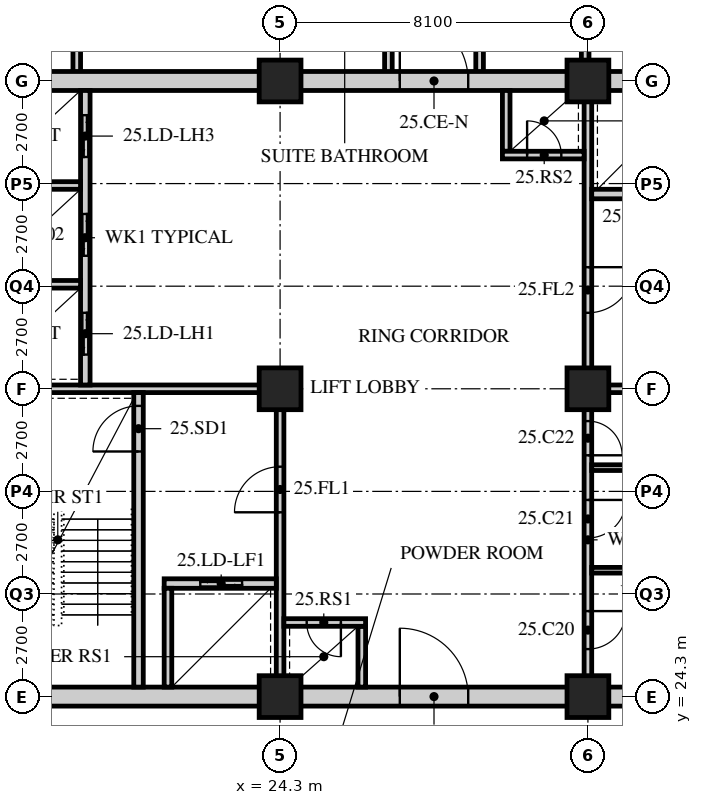
"""IFC4 building model, lengths in metres.
Left out: names, types, materials, properties, quantities, classifications, styles, units other than length and angle.
Written with IfcOpenShell. Run it as: python <this file> out.ifc"""

import sys

from ifc_helpers import new_model, si_unit, direction, frame, frame_2d, origin, origin_2d, place, context, subcontext, project, spatial, rectangle, hollow_rectangle, extrude, element, fill, save


model = new_model("IFC4")
c1 = context("Model", 3, precision=1e-05, world=origin(), true_north=direction((0.0, 1.0)))
c2 = subcontext(c1, "Body", "Model", "MODEL_VIEW")
j1 = project(units=[si_unit("LENGTHUNIT", "METRE"), si_unit("PLANEANGLEUNIT", "RADIAN")], contexts=[c1])
p1 = place(None, origin())
s1 = spatial("IfcSite", under=j1, at=p1, CompositionType="ELEMENT")
p2 = place(p1, origin())
s2 = spatial("IfcBuilding", under=s1, at=p2, CompositionType="ELEMENT")
p3 = place(p2, frame((0.0, 0.0, 103.4)))
s3 = spatial("IfcBuildingStorey", under=s2, at=p3, CompositionType="ELEMENT", Elevation=103.4)
for number, where, z_axis, x_axis in (
    (1, (24.3, 24.3, 0.0), (0.0, 0.0, 1.0), (1.0, 0.0, 0.0)),
    (2, (24.3, 32.4, 0.0), (0.0, 0.0, 1.0), (1.0, 0.0, 0.0)),
    (3, (24.3, 40.5, 0.0), (0.0, 0.0, 1.0), (1.0, 0.0, 0.0)),
    (4, (32.4, 24.3, 0.0), (0.0, 0.0, 1.0), (1.0, 0.0, 0.0)),
    (5, (32.4, 32.4, 0.0), (0.0, 0.0, 1.0), (1.0, 0.0, 0.0)),
    (6, (32.4, 40.5, 0.0), (0.0, 0.0, 1.0), (1.0, 0.0, 0.0)),
):
    element("IfcColumn", number, at=place(p3, frame(where, z_axis=z_axis, x_axis=x_axis)), inside=s3, PredefinedType="COLUMN", context=c2, shape_type="SweptSolid", body=[
        extrude(hollow_rectangle(XDim=1.1, YDim=1.1, WallThickness=0.1, at=origin_2d()), origin(), (0.0, 0.0, 1.0), 3.4),
    ])
p4 = place(p3, frame((18.95, 44.1, 0.0), z_axis=(0.0, 0.0, 1.0), x_axis=(0.0, -1.0, 0.0)))
e7 = element("IfcWall", 7, at=p4, inside=s3, PredefinedType="SOLIDWALL", context=c2, shape_type="SweptSolid", body=[
    extrude(rectangle(XDim=3.6, YDim=0.2, at=frame_2d((1.8, 0.0))), origin(), (0.0, 0.0, 1.0), 3.19),
])
p5 = place(p3, frame((32.328, 44.1, 0.0), z_axis=(0.0, 0.0, 1.0), x_axis=(0.0, -1.0, 0.0)))
e8 = element("IfcWall", 8, at=p5, inside=s3, PredefinedType="SOLIDWALL", context=c2, shape_type="SweptSolid", body=[
    extrude(rectangle(XDim=3.6, YDim=0.2, at=frame_2d((1.8, 0.0))), origin(), (0.0, 0.0, 1.0), 2.578),
])
for number, where, z_axis, x_axis in (
    (9, (27.15, 40.5, 0.0), (0.0, 0.0, 1.0), (0.0, 1.0, 0.0)),
    (10, (29.55, 40.5, 0.0), (0.0, 0.0, 1.0), (0.0, 1.0, 0.0)),
):
    element("IfcWall", number, at=place(p3, frame(where, z_axis=z_axis, x_axis=x_axis)), inside=s3, PredefinedType="SOLIDWALL", context=c2, shape_type="SweptSolid", body=[
        extrude(rectangle(XDim=3.6, YDim=0.2, at=frame_2d((1.8, 0.0))), origin(), (0.0, 0.0, 1.0), 3.19),
    ])
p6 = place(p3, frame((15.95, 24.3, 0.0), z_axis=(0.0, 0.0, 1.0), x_axis=(1.0, 0.0, 0.0)))
e11 = element("IfcWall", 11, at=p6, inside=s3, PredefinedType="SOLIDWALL", context=c2, shape_type="SweptSolid", body=[
    extrude(rectangle(XDim=24.8, YDim=0.5, at=frame_2d((12.4, 0.0))), origin(), (0.0, 0.0, 1.0), 2.54),
])
p7 = place(p6, frame((11.5, 0.0, 0.0)))
e12 = element("IfcOpeningElement", 12, at=p7, cuts=e11, PredefinedType="OPENING", context=c2, shape_type="SweptSolid", body=[
    extrude(rectangle(XDim=1.8, YDim=2.4, at=frame_2d((0.9, 1.2))), frame((0.0, 0.26, 0.0), z_axis=(0.0, -1.0, 0.0), x_axis=(1.0, 0.0, 0.0)), (0.0, 0.0, 1.0), 0.52),
])
p8 = place(p3, frame((15.95, 40.5, 0.0), z_axis=(0.0, 0.0, 1.0), x_axis=(1.0, 0.0, 0.0)))
e13 = element("IfcWall", 13, at=p8, inside=s3, PredefinedType="SOLIDWALL", context=c2, shape_type="SweptSolid", body=[
    extrude(rectangle(XDim=24.8, YDim=0.5, at=frame_2d((12.4, 0.0))), origin(), (0.0, 0.0, 1.0), 2.54),
])
p9 = place(p8, frame((11.5, 0.0, 0.0)))
e14 = element("IfcOpeningElement", 14, at=p9, cuts=e13, PredefinedType="OPENING", context=c2, shape_type="SweptSolid", body=[
    extrude(rectangle(XDim=1.8, YDim=2.4, at=frame_2d((0.9, 1.2))), frame((0.0, 0.26, 0.0), z_axis=(0.0, -1.0, 0.0), x_axis=(1.0, 0.0, 0.0)), (0.0, 0.0, 1.0), 0.52),
])
p10 = place(p3, frame((16.45, 32.4, 0.0), z_axis=(0.0, 0.0, 1.0), x_axis=(1.0, 0.0, 0.0)))
e15 = element("IfcWall", 15, at=p10, inside=s3, PredefinedType="SOLIDWALL", context=c2, shape_type="SweptSolid", body=[
    extrude(rectangle(XDim=7.95, YDim=0.2, at=frame_2d((3.975, 0.0))), origin(), (0.0, 0.0, 1.0), 2.578),
])
p11 = place(p3, frame((24.3, 24.55, 0.0), z_axis=(0.0, 0.0, 1.0), x_axis=(0.0, 1.0, 0.0)))
e16 = element("IfcWall", 16, at=p11, inside=s3, PredefinedType="SOLIDWALL", context=c2, shape_type="SweptSolid", body=[
    extrude(rectangle(XDim=7.75, YDim=0.2, at=frame_2d((3.875, 0.0))), origin(), (0.0, 0.0, 1.0), 2.578),
])
p12 = place(p11, frame((4.6, 0.0, 0.0)))
e17 = element("IfcOpeningElement", 17, at=p12, cuts=e16, PredefinedType="OPENING", context=c2, shape_type="SweptSolid", body=[
    extrude(rectangle(XDim=1.2, YDim=2.1, at=frame_2d((0.6, 1.05))), frame((0.0, 0.11, 0.0), z_axis=(0.0, -1.0, 0.0), x_axis=(1.0, 0.0, 0.0)), (0.0, 0.0, 1.0), 0.22),
])
p13 = place(p3, frame((20.575, 24.55, 0.0), z_axis=(0.0, 0.0, 1.0), x_axis=(0.0, 1.0, 0.0)))
e18 = element("IfcWall", 18, at=p13, inside=s3, PredefinedType="SOLIDWALL", context=c2, shape_type="SweptSolid", body=[
    extrude(rectangle(XDim=7.75, YDim=0.25, at=frame_2d((3.875, 0.0))), origin(), (0.0, 0.0, 1.0), 3.19),
])
p14 = place(p13, frame((6.2, 0.0, 0.0)))
e19 = element("IfcOpeningElement", 19, at=p14, cuts=e18, PredefinedType="OPENING", context=c2, shape_type="SweptSolid", body=[
    extrude(rectangle(XDim=1.2, YDim=2.1, at=frame_2d((0.6, 1.05))), frame((0.0, 0.135, 0.0), z_axis=(0.0, -1.0, 0.0), x_axis=(1.0, 0.0, 0.0)), (0.0, 0.0, 1.0), 0.27),
])
p15 = place(p3, frame((21.25, 27.275, 0.0), z_axis=(0.0, 0.0, 1.0), x_axis=(1.0, 0.0, 0.0)))
e20 = element("IfcWall", 20, at=p15, inside=s3, PredefinedType="SOLIDWALL", context=c2, shape_type="SweptSolid", body=[
    extrude(rectangle(XDim=2.95, YDim=0.25, at=frame_2d((1.475, 0.0))), origin(), (0.0, 0.0, 1.0), 3.19),
])
p16 = place(p15, frame((0.95, 0.0, 0.0)))
e21 = element("IfcOpeningElement", 21, at=p16, cuts=e20, PredefinedType="OPENING", context=c2, shape_type="SweptSolid", body=[
    extrude(rectangle(XDim=1.1, YDim=2.4, at=frame_2d((0.55, 1.2))), frame((0.0, 0.135, 0.0), z_axis=(0.0, -1.0, 0.0), x_axis=(1.0, 0.0, 0.0)), (0.0, 0.0, 1.0), 0.27),
])
p17 = place(p3, frame((21.35, 24.55, 0.0), z_axis=(0.0, 0.0, 1.0), x_axis=(0.0, 1.0, 0.0)))
e22 = element("IfcWall", 22, at=p17, inside=s3, PredefinedType="SOLIDWALL", context=c2, shape_type="SweptSolid", body=[
    extrude(rectangle(XDim=2.6, YDim=0.2, at=frame_2d((1.3, 0.0))), origin(), (0.0, 0.0, 1.0), 3.19),
])
p18 = place(p3, frame((19.175, 32.5, 0.0), z_axis=(0.0, 0.0, 1.0), x_axis=(0.0, 1.0, 0.0)))
e23 = element("IfcWall", 23, at=p18, inside=s3, PredefinedType="SOLIDWALL", context=c2, shape_type="SweptSolid", body=[
    extrude(rectangle(XDim=7.75, YDim=0.25, at=frame_2d((3.875, 0.0))), origin(), (0.0, 0.0, 1.0), 3.19),
])
p19 = place(p18, frame((0.8, 0.0, 0.0)))
e24 = element("IfcOpeningElement", 24, at=p19, cuts=e23, PredefinedType="OPENING", context=c2, shape_type="SweptSolid", body=[
    extrude(rectangle(XDim=1.1, YDim=2.4, at=frame_2d((0.55, 1.2))), frame((0.0, 0.135, 0.0), z_axis=(0.0, -1.0, 0.0), x_axis=(1.0, 0.0, 0.0)), (0.0, 0.0, 1.0), 0.27),
])
p20 = place(p18, frame((3.4, 0.0, 0.0)))
e25 = element("IfcOpeningElement", 25, at=p20, cuts=e23, PredefinedType="OPENING", context=c2, shape_type="SweptSolid", body=[
    extrude(rectangle(XDim=1.1, YDim=2.4, at=frame_2d((0.55, 1.2))), frame((0.0, 0.135, 0.0), z_axis=(0.0, -1.0, 0.0), x_axis=(1.0, 0.0, 0.0)), (0.0, 0.0, 1.0), 0.27),
])
p21 = place(p18, frame((6.0, 0.0, 0.0)))
e26 = element("IfcOpeningElement", 26, at=p21, cuts=e23, PredefinedType="OPENING", context=c2, shape_type="SweptSolid", body=[
    extrude(rectangle(XDim=1.1, YDim=2.4, at=frame_2d((0.55, 1.2))), frame((0.0, 0.135, 0.0), z_axis=(0.0, -1.0, 0.0), x_axis=(1.0, 0.0, 0.0)), (0.0, 0.0, 1.0), 0.27),
])
for number, where, z_axis, x_axis in (
    (27, (16.45, 35.15, 0.0), (0.0, 0.0, 1.0), (1.0, 0.0, 0.0)),
    (28, (16.45, 37.75, 0.0), (0.0, 0.0, 1.0), (1.0, 0.0, 0.0)),
):
    element("IfcWall", number, at=place(p3, frame(where, z_axis=z_axis, x_axis=x_axis)), inside=s3, PredefinedType="SOLIDWALL", context=c2, shape_type="SweptSolid", body=[
        extrude(rectangle(XDim=2.6, YDim=0.2, at=frame_2d((1.3, 0.0))), origin(), (0.0, 0.0, 1.0), 3.19),
    ])
p22 = place(p3, frame((26.45, 24.55, 0.0), z_axis=(0.0, 0.0, 1.0), x_axis=(0.0, 1.0, 0.0)))
e29 = element("IfcWall", 29, at=p22, inside=s3, PredefinedType="SOLIDWALL", context=c2, shape_type="SweptSolid", body=[
    extrude(rectangle(XDim=1.6, YDim=0.2, at=frame_2d((0.8, 0.0))), origin(), (0.0, 0.0, 1.0), 3.19),
])
p23 = place(p3, frame((24.4, 26.25, 0.0), z_axis=(0.0, 0.0, 1.0), x_axis=(1.0, 0.0, 0.0)))
e30 = element("IfcWall", 30, at=p23, inside=s3, PredefinedType="SOLIDWALL", context=c2, shape_type="SweptSolid", body=[
    extrude(rectangle(XDim=2.15, YDim=0.2, at=frame_2d((1.075, 0.0))), origin(), (0.0, 0.0, 1.0), 3.19),
])
p24 = place(p23, frame((0.6, 0.0, 0.0)))
e31 = element("IfcOpeningElement", 31, at=p24, cuts=e30, PredefinedType="OPENING", context=c2, shape_type="SweptSolid", body=[
    extrude(rectangle(XDim=0.9, YDim=2.1, at=frame_2d((0.45, 1.05))), frame((0.0, 0.11, 0.0), z_axis=(0.0, -1.0, 0.0), x_axis=(1.0, 0.0, 0.0)), (0.0, 0.0, 1.0), 0.22),
])
p25 = place(p3, frame((32.3, 32.4, 0.0), z_axis=(0.0, 0.0, 1.0), x_axis=(1.0, 0.0, 0.0)))
e32 = element("IfcWall", 32, at=p25, inside=s3, PredefinedType="SOLIDWALL", context=c2, shape_type="SweptSolid", body=[
    extrude(rectangle(XDim=7.95, YDim=0.2, at=frame_2d((3.975, 0.0))), origin(), (0.0, 0.0, 1.0), 2.578),
])
p26 = place(p3, frame((32.4, 32.5, 0.0), z_axis=(0.0, 0.0, 1.0), x_axis=(0.0, 1.0, 0.0)))
e33 = element("IfcWall", 33, at=p26, inside=s3, PredefinedType="SOLIDWALL", context=c2, shape_type="SweptSolid", body=[
    extrude(rectangle(XDim=7.75, YDim=0.2, at=frame_2d((3.875, 0.0))), origin(), (0.0, 0.0, 1.0), 2.578),
])
p27 = place(p26, frame((1.9, 0.0, 0.0)))
e34 = element("IfcOpeningElement", 34, at=p27, cuts=e33, PredefinedType="OPENING", context=c2, shape_type="SweptSolid", body=[
    extrude(rectangle(XDim=1.2, YDim=2.1, at=frame_2d((0.6, 1.05))), frame((0.0, 0.11, 0.0), z_axis=(0.0, -1.0, 0.0), x_axis=(1.0, 0.0, 0.0)), (0.0, 0.0, 1.0), 0.22),
])
p28 = place(p3, frame((32.5, 37.525, 0.0), z_axis=(0.0, 0.0, 1.0), x_axis=(1.0, 0.0, 0.0)))
e35 = element("IfcWall", 35, at=p28, inside=s3, PredefinedType="SOLIDWALL", context=c2, shape_type="SweptSolid", body=[
    extrude(rectangle(XDim=2.95, YDim=0.25, at=frame_2d((1.475, 0.0))), origin(), (0.0, 0.0, 1.0), 3.19),
])
p29 = place(p28, frame((0.9, 0.0, 0.0)))
e36 = element("IfcOpeningElement", 36, at=p29, cuts=e35, PredefinedType="OPENING", context=c2, shape_type="SweptSolid", body=[
    extrude(rectangle(XDim=1.1, YDim=2.4, at=frame_2d((0.55, 1.2))), frame((0.0, 0.135, 0.0), z_axis=(0.0, -1.0, 0.0), x_axis=(1.0, 0.0, 0.0)), (0.0, 0.0, 1.0), 0.27),
])
p30 = place(p3, frame((30.25, 38.65, 0.0), z_axis=(0.0, 0.0, 1.0), x_axis=(0.0, 1.0, 0.0)))
e37 = element("IfcWall", 37, at=p30, inside=s3, PredefinedType="SOLIDWALL", context=c2, shape_type="SweptSolid", body=[
    extrude(rectangle(XDim=1.6, YDim=0.2, at=frame_2d((0.8, 0.0))), origin(), (0.0, 0.0, 1.0), 3.19),
])
p31 = place(p3, frame((30.15, 38.55, 0.0), z_axis=(0.0, 0.0, 1.0), x_axis=(1.0, 0.0, 0.0)))
e38 = element("IfcWall", 38, at=p31, inside=s3, PredefinedType="SOLIDWALL", context=c2, shape_type="SweptSolid", body=[
    extrude(rectangle(XDim=2.15, YDim=0.2, at=frame_2d((1.075, 0.0))), origin(), (0.0, 0.0, 1.0), 3.19),
])
p32 = place(p31, frame((0.65, 0.0, 0.0)))
e39 = element("IfcOpeningElement", 39, at=p32, cuts=e38, PredefinedType="OPENING", context=c2, shape_type="SweptSolid", body=[
    extrude(rectangle(XDim=0.9, YDim=2.1, at=frame_2d((0.45, 1.05))), frame((0.0, 0.11, 0.0), z_axis=(0.0, -1.0, 0.0), x_axis=(1.0, 0.0, 0.0)), (0.0, 0.0, 1.0), 0.22),
])
p33 = place(p3, frame((32.4, 24.55, 0.0), z_axis=(0.0, 0.0, 1.0), x_axis=(0.0, 1.0, 0.0)))
e40 = element("IfcWall", 40, at=p33, inside=s3, PredefinedType="PARTITIONING", context=c2, shape_type="SweptSolid", body=[
    extrude(rectangle(XDim=7.75, YDim=0.2, at=frame_2d((3.875, 0.0))), origin(), (0.0, 0.0, 1.0), 2.578),
])
p34 = place(p33, frame((1.0, 0.0, 0.0)))
e41 = element("IfcOpeningElement", 41, at=p34, cuts=e40, PredefinedType="OPENING", context=c2, shape_type="SweptSolid", body=[
    extrude(rectangle(XDim=1.0, YDim=2.1, at=frame_2d((0.5, 1.05))), frame((0.0, 0.11, 0.0), z_axis=(0.0, -1.0, 0.0), x_axis=(1.0, 0.0, 0.0)), (0.0, 0.0, 1.0), 0.22),
])
p35 = place(p33, frame((3.925, 0.0, 0.0)))
e42 = element("IfcOpeningElement", 42, at=p35, cuts=e40, PredefinedType="OPENING", context=c2, shape_type="SweptSolid", body=[
    extrude(rectangle(XDim=1.0, YDim=2.1, at=frame_2d((0.5, 1.05))), frame((0.0, 0.11, 0.0), z_axis=(0.0, -1.0, 0.0), x_axis=(1.0, 0.0, 0.0)), (0.0, 0.0, 1.0), 0.22),
])
p36 = place(p33, frame((6.1, 0.0, 0.0)))
e43 = element("IfcOpeningElement", 43, at=p36, cuts=e40, PredefinedType="OPENING", context=c2, shape_type="SweptSolid", body=[
    extrude(rectangle(XDim=0.9, YDim=2.1, at=frame_2d((0.45, 1.05))), frame((0.0, 0.11, 0.0), z_axis=(0.0, -1.0, 0.0), x_axis=(1.0, 0.0, 0.0)), (0.0, 0.0, 1.0), 0.22),
])
for number, where, z_axis, x_axis in (
    (44, (32.5, 27.625, 0.0), (0.0, 0.0, 1.0), (1.0, 0.0, 0.0)),
    (45, (32.5, 30.325, 0.0), (0.0, 0.0, 1.0), (1.0, 0.0, 0.0)),
):
    element("IfcWall", number, at=place(p3, frame(where, z_axis=z_axis, x_axis=x_axis)), inside=s3, PredefinedType="PARTITIONING", context=c2, shape_type="SweptSolid", body=[
        extrude(rectangle(XDim=4.9, YDim=0.15, at=frame_2d((2.45, 0.0))), origin(), (0.0, 0.0, 1.0), 3.19),
    ])
p37 = place(p34, origin())
e46 = element("IfcDoor", 46, at=p37, inside=s3, OperationType="SINGLE_SWING_LEFT", PredefinedType="DOOR", context=c2, shape_type="SweptSolid", body=[
    extrude(rectangle(XDim=1.0, YDim=2.1, at=frame_2d((0.5, 1.05))), frame((0.0, 0.025, 0.0), z_axis=(0.0, -1.0, 0.0), x_axis=(1.0, 0.0, 0.0)), (0.0, 0.0, 1.0), 0.05),
])
fill(e41, e46)
p38 = place(p35, origin())
e47 = element("IfcDoor", 47, at=p38, inside=s3, OperationType="SINGLE_SWING_LEFT", PredefinedType="DOOR", context=c2, shape_type="SweptSolid", body=[
    extrude(rectangle(XDim=1.0, YDim=2.1, at=frame_2d((0.5, 1.05))), frame((0.0, 0.025, 0.0), z_axis=(0.0, -1.0, 0.0), x_axis=(1.0, 0.0, 0.0)), (0.0, 0.0, 1.0), 0.05),
])
fill(e42, e47)
p39 = place(p36, origin())
e48 = element("IfcDoor", 48, at=p39, inside=s3, OperationType="SINGLE_SWING_RIGHT", PredefinedType="DOOR", context=c2, shape_type="SweptSolid", body=[
    extrude(rectangle(XDim=0.9, YDim=2.1, at=frame_2d((0.45, 1.05))), frame((0.0, 0.025, 0.0), z_axis=(0.0, -1.0, 0.0), x_axis=(1.0, 0.0, 0.0)), (0.0, 0.0, 1.0), 0.05),
])
fill(e43, e48)
p40 = place(p14, origin())
e49 = element("IfcDoor", 49, at=p40, inside=s3, OperationType="SINGLE_SWING_LEFT", PredefinedType="DOOR", context=c2, shape_type="SweptSolid", body=[
    extrude(rectangle(XDim=1.2, YDim=2.1, at=frame_2d((0.6, 1.05))), frame((0.0, 0.025, 0.0), z_axis=(0.0, -1.0, 0.0), x_axis=(1.0, 0.0, 0.0)), (0.0, 0.0, 1.0), 0.05),
])
fill(e19, e49)
p41 = place(p12, origin())
e50 = element("IfcDoor", 50, at=p41, inside=s3, OperationType="SINGLE_SWING_LEFT", PredefinedType="DOOR", context=c2, shape_type="SweptSolid", body=[
    extrude(rectangle(XDim=1.2, YDim=2.1, at=frame_2d((0.6, 1.05))), frame((0.0, 0.025, 0.0), z_axis=(0.0, -1.0, 0.0), x_axis=(1.0, 0.0, 0.0)), (0.0, 0.0, 1.0), 0.05),
])
fill(e17, e50)
p42 = place(p24, origin())
e51 = element("IfcDoor", 51, at=p42, inside=s3, OperationType="SINGLE_SWING_LEFT", PredefinedType="DOOR", context=c2, shape_type="SweptSolid", body=[
    extrude(rectangle(XDim=0.9, YDim=2.1, at=frame_2d((0.45, 1.05))), frame((0.0, 0.025, 0.0), z_axis=(0.0, -1.0, 0.0), x_axis=(1.0, 0.0, 0.0)), (0.0, 0.0, 1.0), 0.05),
])
fill(e31, e51)
p43 = place(p27, origin())
e52 = element("IfcDoor", 52, at=p43, inside=s3, OperationType="SINGLE_SWING_LEFT", PredefinedType="DOOR", context=c2, shape_type="SweptSolid", body=[
    extrude(rectangle(XDim=1.2, YDim=2.1, at=frame_2d((0.6, 1.05))), frame((0.0, 0.025, 0.0), z_axis=(0.0, -1.0, 0.0), x_axis=(1.0, 0.0, 0.0)), (0.0, 0.0, 1.0), 0.05),
])
fill(e34, e52)
p44 = place(p32, origin())
e53 = element("IfcDoor", 53, at=p44, inside=s3, OperationType="SINGLE_SWING_LEFT", PredefinedType="DOOR", context=c2, shape_type="SweptSolid", body=[
    extrude(rectangle(XDim=0.9, YDim=2.1, at=frame_2d((0.45, 1.05))), frame((0.0, 0.025, 0.0), z_axis=(0.0, -1.0, 0.0), x_axis=(1.0, 0.0, 0.0)), (0.0, 0.0, 1.0), 0.05),
])
fill(e39, e53)
p45 = place(p19, origin())
e54 = element("IfcDoor", 54, at=p45, inside=s3, OperationType="DOUBLE_DOOR_SLIDING", PredefinedType="DOOR", context=c2, shape_type="SweptSolid", body=[
    extrude(rectangle(XDim=1.1, YDim=2.4, at=frame_2d((0.55, 1.2))), frame((0.0, 0.025, 0.0), z_axis=(0.0, -1.0, 0.0), x_axis=(1.0, 0.0, 0.0)), (0.0, 0.0, 1.0), 0.05),
])
fill(e24, e54)
p46 = place(p20, origin())
e55 = element("IfcDoor", 55, at=p46, inside=s3, OperationType="DOUBLE_DOOR_SLIDING", PredefinedType="DOOR", context=c2, shape_type="SweptSolid", body=[
    extrude(rectangle(XDim=1.1, YDim=2.4, at=frame_2d((0.55, 1.2))), frame((0.0, 0.025, 0.0), z_axis=(0.0, -1.0, 0.0), x_axis=(1.0, 0.0, 0.0)), (0.0, 0.0, 1.0), 0.05),
])
fill(e25, e55)
p47 = place(p21, origin())
e56 = element("IfcDoor", 56, at=p47, inside=s3, OperationType="DOUBLE_DOOR_SLIDING", PredefinedType="DOOR", context=c2, shape_type="SweptSolid", body=[
    extrude(rectangle(XDim=1.1, YDim=2.4, at=frame_2d((0.55, 1.2))), frame((0.0, 0.025, 0.0), z_axis=(0.0, -1.0, 0.0), x_axis=(1.0, 0.0, 0.0)), (0.0, 0.0, 1.0), 0.05),
])
fill(e26, e56)
p48 = place(p16, origin())
e57 = element("IfcDoor", 57, at=p48, inside=s3, OperationType="DOUBLE_DOOR_SLIDING", PredefinedType="DOOR", context=c2, shape_type="SweptSolid", body=[
    extrude(rectangle(XDim=1.1, YDim=2.4, at=frame_2d((0.55, 1.2))), frame((0.0, 0.025, 0.0), z_axis=(0.0, -1.0, 0.0), x_axis=(1.0, 0.0, 0.0)), (0.0, 0.0, 1.0), 0.05),
])
fill(e21, e57)
p49 = place(p7, origin())
e58 = element("IfcDoor", 58, at=p49, inside=s3, OperationType="DOUBLE_DOOR_SINGLE_SWING", PredefinedType="DOOR", context=c2, shape_type="SweptSolid", body=[
    extrude(rectangle(XDim=1.8, YDim=2.4, at=frame_2d((0.9, 1.2))), frame((0.0, 0.025, 0.0), z_axis=(0.0, -1.0, 0.0), x_axis=(1.0, 0.0, 0.0)), (0.0, 0.0, 1.0), 0.05),
])
fill(e12, e58)
p50 = place(p9, origin())
e59 = element("IfcDoor", 59, at=p50, inside=s3, OperationType="DOUBLE_DOOR_SINGLE_SWING", PredefinedType="DOOR", context=c2, shape_type="SweptSolid", body=[
    extrude(rectangle(XDim=1.8, YDim=2.4, at=frame_2d((0.9, 1.2))), frame((0.0, 0.025, 0.0), z_axis=(0.0, -1.0, 0.0), x_axis=(1.0, 0.0, 0.0)), (0.0, 0.0, 1.0), 0.05),
])
fill(e14, e59)
save(model, sys.argv[1])
